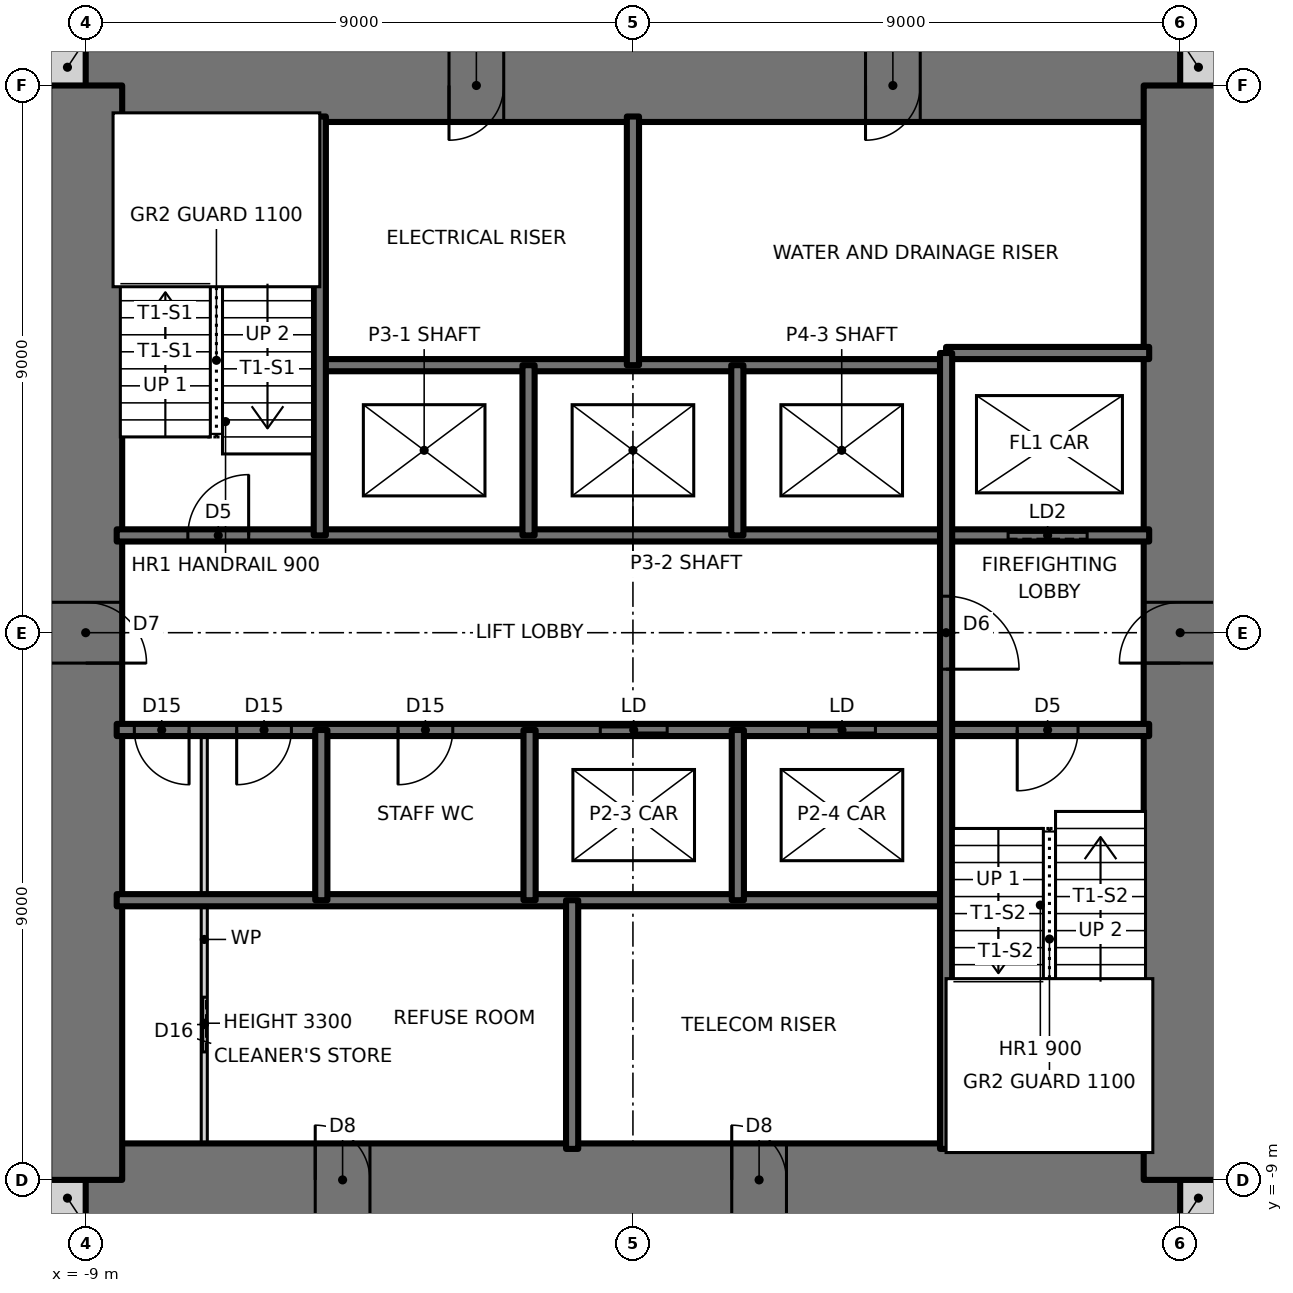
"""IFC4 building model, lengths in metres.
Left out: names, types, materials, properties, quantities, classifications, styles, units other than length and angle.
Written with IfcOpenShell. Run it as: python <this file> out.ifc"""

import sys

from ifc_helpers import new_model, si_unit, direction, frame, frame_2d, origin, place, context, subcontext, project, spatial, rectangle, extrude, element, fill, save


model = new_model("IFC4")
c1 = context("Model", 3, precision=1e-05, world=origin(), true_north=direction((0.0, 1.0)))
c2 = subcontext(c1, "Body", "Model", "MODEL_VIEW")
j1 = project(units=[si_unit("LENGTHUNIT", "METRE"), si_unit("PLANEANGLEUNIT", "RADIAN")], contexts=[c1])
p1 = place(None, origin())
s1 = spatial("IfcSite", under=j1, at=p1, CompositionType="ELEMENT")
p2 = place(p1, origin())
s2 = spatial("IfcBuilding", under=s1, at=p2, CompositionType="ELEMENT")
p3 = place(p2, frame((0.0, 0.0, 105.0)))
s3 = spatial("IfcBuildingStorey", under=s2, at=p3, CompositionType="ELEMENT", Elevation=105.0)
for number, where, z_axis, x_axis in (
    (1, (-9.6, -9.3, 0.0), (0.0, 0.0, 1.0), (1.0, 0.0, 0.0)),
    (2, (9.0, -9.3, 0.0), (0.0, 0.0, 1.0), (1.0, 0.0, 0.0)),
    (3, (9.0, 9.3, 0.0), (0.0, 0.0, 1.0), (1.0, 0.0, 0.0)),
    (4, (-9.6, 9.3, 0.0), (0.0, 0.0, 1.0), (1.0, 0.0, 0.0)),
):
    element("IfcWall", number, at=place(p3, frame(where, z_axis=z_axis, x_axis=x_axis)), inside=s3, PredefinedType="SOLIDWALL", context=c2, shape_type="SweptSolid", body=[
        extrude(rectangle(XDim=0.6, YDim=0.6, at=frame_2d((0.3, 0.0))), origin(), (0.0, 0.0, 1.0), 3.5),
    ])
p4 = place(p3, frame((-9.0, -9.0, 0.0), z_axis=(0.0, 0.0, 1.0), x_axis=(1.0, 0.0, 0.0)))
e5 = element("IfcWall", 5, at=p4, inside=s3, PredefinedType="SHEAR", context=c2, shape_type="SweptSolid", body=[
    extrude(rectangle(XDim=18.0, YDim=1.2, at=frame_2d((9.0, 0.0))), origin(), (0.0, 0.0, 1.0), 3.5),
])
p5 = place(p4, frame((3.775, 0.0, 0.0)))
e6 = element("IfcOpeningElement", 6, at=p5, cuts=e5, PredefinedType="OPENING", context=c2, shape_type="SweptSolid", body=[
    extrude(rectangle(XDim=0.9, YDim=2.1, at=frame_2d((0.45, 1.05))), frame((0.0, 0.61, 0.0), z_axis=(0.0, -1.0, 0.0), x_axis=(1.0, 0.0, 0.0)), (0.0, 0.0, 1.0), 1.22),
])
p6 = place(p4, frame((10.625, 0.0, 0.0)))
e7 = element("IfcOpeningElement", 7, at=p6, cuts=e5, PredefinedType="OPENING", context=c2, shape_type="SweptSolid", body=[
    extrude(rectangle(XDim=0.9, YDim=2.1, at=frame_2d((0.45, 1.05))), frame((0.0, 0.61, 0.0), z_axis=(0.0, -1.0, 0.0), x_axis=(1.0, 0.0, 0.0)), (0.0, 0.0, 1.0), 1.22),
])
p7 = place(p3, frame((9.0, 9.0, 0.0), z_axis=(0.0, 0.0, 1.0), x_axis=(-1.0, 0.0, 0.0)))
e8 = element("IfcWall", 8, at=p7, inside=s3, PredefinedType="SHEAR", context=c2, shape_type="SweptSolid", body=[
    extrude(rectangle(XDim=18.0, YDim=1.2, at=frame_2d((9.0, 0.0))), origin(), (0.0, 0.0, 1.0), 3.5),
])
p8 = place(p7, frame((11.125, 0.0, 0.0)))
e9 = element("IfcOpeningElement", 9, at=p8, cuts=e8, PredefinedType="OPENING", context=c2, shape_type="SweptSolid", body=[
    extrude(rectangle(XDim=0.9, YDim=2.1, at=frame_2d((0.45, 1.05))), frame((0.0, 0.61, 0.0), z_axis=(0.0, -1.0, 0.0), x_axis=(1.0, 0.0, 0.0)), (0.0, 0.0, 1.0), 1.22),
])
p9 = place(p7, frame((4.275, 0.0, 0.0)))
e10 = element("IfcOpeningElement", 10, at=p9, cuts=e8, PredefinedType="OPENING", context=c2, shape_type="SweptSolid", body=[
    extrude(rectangle(XDim=0.9, YDim=2.1, at=frame_2d((0.45, 1.05))), frame((0.0, 0.61, 0.0), z_axis=(0.0, -1.0, 0.0), x_axis=(1.0, 0.0, 0.0)), (0.0, 0.0, 1.0), 1.22),
])
p10 = place(p3, frame((9.0, -9.0, 0.0), z_axis=(0.0, 0.0, 1.0), x_axis=(0.0, 1.0, 0.0)))
e11 = element("IfcWall", 11, at=p10, inside=s3, PredefinedType="SHEAR", context=c2, shape_type="SweptSolid", body=[
    extrude(rectangle(XDim=18.0, YDim=1.2, at=frame_2d((9.0, 0.0))), origin(), (0.0, 0.0, 1.0), 3.5),
])
p11 = place(p10, frame((8.5, 0.0, 0.0)))
e12 = element("IfcOpeningElement", 12, at=p11, cuts=e11, PredefinedType="OPENING", context=c2, shape_type="SweptSolid", body=[
    extrude(rectangle(XDim=1.0, YDim=2.1, at=frame_2d((0.5, 1.05))), frame((0.0, 0.61, 0.0), z_axis=(0.0, -1.0, 0.0), x_axis=(1.0, 0.0, 0.0)), (0.0, 0.0, 1.0), 1.22),
])
p12 = place(p3, frame((-9.0, 9.0, 0.0), z_axis=(0.0, 0.0, 1.0), x_axis=(0.0, -1.0, 0.0)))
e13 = element("IfcWall", 13, at=p12, inside=s3, PredefinedType="SHEAR", context=c2, shape_type="SweptSolid", body=[
    extrude(rectangle(XDim=18.0, YDim=1.2, at=frame_2d((9.0, 0.0))), origin(), (0.0, 0.0, 1.0), 3.5),
])
p13 = place(p12, frame((8.5, 0.0, 0.0)))
e14 = element("IfcOpeningElement", 14, at=p13, cuts=e13, PredefinedType="OPENING", context=c2, shape_type="SweptSolid", body=[
    extrude(rectangle(XDim=1.0, YDim=2.1, at=frame_2d((0.5, 1.05))), frame((0.0, 0.61, 0.0), z_axis=(0.0, -1.0, 0.0), x_axis=(1.0, 0.0, 0.0)), (0.0, 0.0, 1.0), 1.22),
])
p14 = place(p3, frame((-8.49, -4.4, 0.0), z_axis=(0.0, 0.0, 1.0), x_axis=(1.0, 0.0, 0.0)))
e15 = element("IfcWall", 15, at=p14, inside=s3, PredefinedType="SOLIDWALL", context=c2, shape_type="SweptSolid", body=[
    extrude(rectangle(XDim=13.64, YDim=0.2, at=frame_2d((6.82, 0.0))), origin(), (0.0, 0.0, 1.0), 3.5),
])
p15 = place(p3, frame((-8.49, -1.6, 0.0), z_axis=(0.0, 0.0, 1.0), x_axis=(1.0, 0.0, 0.0)))
e16 = element("IfcWall", 16, at=p15, inside=s3, PredefinedType="SOLIDWALL", context=c2, shape_type="SweptSolid", body=[
    extrude(rectangle(XDim=16.98, YDim=0.2, at=frame_2d((8.49, 0.0))), origin(), (0.0, 0.0, 1.0), 3.5),
])
p16 = place(p15, frame((14.81, 0.0, 0.0)))
e17 = element("IfcOpeningElement", 17, at=p16, cuts=e16, PredefinedType="OPENING", context=c2, shape_type="SweptSolid", body=[
    extrude(rectangle(XDim=1.0, YDim=2.1, at=frame_2d((0.5, 1.05))), frame((0.0, 0.11, 0.0), z_axis=(0.0, -1.0, 0.0), x_axis=(1.0, 0.0, 0.0)), (0.0, 0.0, 1.0), 0.22),
])
p17 = place(p15, frame((1.973, 0.0, 0.0)))
e18 = element("IfcOpeningElement", 18, at=p17, cuts=e16, PredefinedType="OPENING", context=c2, shape_type="SweptSolid", body=[
    extrude(rectangle(XDim=0.9, YDim=2.1, at=frame_2d((0.45, 1.05))), frame((0.0, 0.11, 0.0), z_axis=(0.0, -1.0, 0.0), x_axis=(1.0, 0.0, 0.0)), (0.0, 0.0, 1.0), 0.22),
])
p18 = place(p15, frame((0.29, 0.0, 0.0)))
e19 = element("IfcOpeningElement", 19, at=p18, cuts=e16, PredefinedType="OPENING", context=c2, shape_type="SweptSolid", body=[
    extrude(rectangle(XDim=0.9, YDim=2.1, at=frame_2d((0.45, 1.05))), frame((0.0, 0.11, 0.0), z_axis=(0.0, -1.0, 0.0), x_axis=(1.0, 0.0, 0.0)), (0.0, 0.0, 1.0), 0.22),
])
p19 = place(p15, frame((4.627, 0.0, 0.0)))
e20 = element("IfcOpeningElement", 20, at=p19, cuts=e16, PredefinedType="OPENING", context=c2, shape_type="SweptSolid", body=[
    extrude(rectangle(XDim=0.9, YDim=2.1, at=frame_2d((0.45, 1.05))), frame((0.0, 0.11, 0.0), z_axis=(0.0, -1.0, 0.0), x_axis=(1.0, 0.0, 0.0)), (0.0, 0.0, 1.0), 0.22),
])
p20 = place(p15, frame((7.953, 0.0, 0.0)))
e21 = element("IfcOpeningElement", 21, at=p20, cuts=e16, PredefinedType="OPENING", context=c2, shape_type="SweptSolid", body=[
    extrude(rectangle(XDim=1.1, YDim=2.1, at=frame_2d((0.55, 1.05))), frame((0.0, 0.11, 0.0), z_axis=(0.0, -1.0, 0.0), x_axis=(1.0, 0.0, 0.0)), (0.0, 0.0, 1.0), 0.22),
])
p21 = place(p15, frame((11.378, 0.0, 0.0)))
e22 = element("IfcOpeningElement", 22, at=p21, cuts=e16, PredefinedType="OPENING", context=c2, shape_type="SweptSolid", body=[
    extrude(rectangle(XDim=1.1, YDim=2.1, at=frame_2d((0.55, 1.05))), frame((0.0, 0.11, 0.0), z_axis=(0.0, -1.0, 0.0), x_axis=(1.0, 0.0, 0.0)), (0.0, 0.0, 1.0), 0.22),
])
p22 = place(p3, frame((-8.49, 1.6, 0.0), z_axis=(0.0, 0.0, 1.0), x_axis=(1.0, 0.0, 0.0)))
e23 = element("IfcWall", 23, at=p22, inside=s3, PredefinedType="SOLIDWALL", context=c2, shape_type="SweptSolid", body=[
    extrude(rectangle(XDim=16.98, YDim=0.2, at=frame_2d((8.49, 0.0))), origin(), (0.0, 0.0, 1.0), 3.5),
])
p23 = place(p22, frame((1.17, 0.0, 0.0)))
e24 = element("IfcOpeningElement", 24, at=p23, cuts=e23, PredefinedType="OPENING", context=c2, shape_type="SweptSolid", body=[
    extrude(rectangle(XDim=1.0, YDim=2.1, at=frame_2d((0.5, 1.05))), frame((0.0, 0.11, 0.0), z_axis=(0.0, -1.0, 0.0), x_axis=(1.0, 0.0, 0.0)), (0.0, 0.0, 1.0), 0.22),
])
p24 = place(p22, frame((14.66, 0.0, 0.0)))
e25 = element("IfcOpeningElement", 25, at=p24, cuts=e23, PredefinedType="OPENING", context=c2, shape_type="SweptSolid", body=[
    extrude(rectangle(XDim=1.3, YDim=2.1, at=frame_2d((0.65, 1.05))), frame((0.0, 0.11, 0.0), z_axis=(0.0, -1.0, 0.0), x_axis=(1.0, 0.0, 0.0)), (0.0, 0.0, 1.0), 0.22),
])
p25 = place(p3, frame((-5.15, 4.4, 0.0), z_axis=(0.0, 0.0, 1.0), x_axis=(1.0, 0.0, 0.0)))
e26 = element("IfcWall", 26, at=p25, inside=s3, PredefinedType="SOLIDWALL", context=c2, shape_type="SweptSolid", body=[
    extrude(rectangle(XDim=10.3, YDim=0.2, at=frame_2d((5.15, 0.0))), origin(), (0.0, 0.0, 1.0), 3.5),
])
p26 = place(p3, frame((5.15, 4.6, 0.0), z_axis=(0.0, 0.0, 1.0), x_axis=(1.0, 0.0, 0.0)))
e27 = element("IfcWall", 27, at=p26, inside=s3, PredefinedType="SOLIDWALL", context=c2, shape_type="SweptSolid", body=[
    extrude(rectangle(XDim=3.34, YDim=0.2, at=frame_2d((1.67, 0.0))), origin(), (0.0, 0.0, 1.0), 3.5),
])
p27 = place(p3, frame((5.15, -8.49, 0.0), z_axis=(0.0, 0.0, 1.0), x_axis=(0.0, 1.0, 0.0)))
e28 = element("IfcWall", 28, at=p27, inside=s3, PredefinedType="SOLIDWALL", context=c2, shape_type="SweptSolid", body=[
    extrude(rectangle(XDim=13.09, YDim=0.2, at=frame_2d((6.545, 0.0))), origin(), (0.0, 0.0, 1.0), 3.5),
])
p28 = place(p27, frame((7.89, 0.0, 0.0)))
e29 = element("IfcOpeningElement", 29, at=p28, cuts=e28, PredefinedType="OPENING", context=c2, shape_type="SweptSolid", body=[
    extrude(rectangle(XDim=1.2, YDim=2.1, at=frame_2d((0.6, 1.05))), frame((0.0, 0.11, 0.0), z_axis=(0.0, -1.0, 0.0), x_axis=(1.0, 0.0, 0.0)), (0.0, 0.0, 1.0), 0.22),
])
for number, where, z_axis, x_axis in (
    (30, (1.725, -4.4, 0.0), (0.0, 0.0, 1.0), (0.0, 1.0, 0.0)),
    (31, (1.717, 1.6, 0.0), (0.0, 0.0, 1.0), (0.0, 1.0, 0.0)),
):
    element("IfcWall", number, at=place(p3, frame(where, z_axis=z_axis, x_axis=x_axis)), inside=s3, PredefinedType="SOLIDWALL", context=c2, shape_type="SweptSolid", body=[
        extrude(rectangle(XDim=2.8, YDim=0.2, at=frame_2d((1.4, 0.0))), origin(), (0.0, 0.0, 1.0), 3.5),
    ])
for number, where, z_axis, x_axis in (
    (32, (0.0, 4.4, 0.0), (0.0, 0.0, 1.0), (0.0, 1.0, 0.0)),
    (33, (-1.0, -8.49, 0.0), (0.0, 0.0, 1.0), (0.0, 1.0, 0.0)),
):
    element("IfcWall", number, at=place(p3, frame(where, z_axis=z_axis, x_axis=x_axis)), inside=s3, PredefinedType="SOLIDWALL", context=c2, shape_type="SweptSolid", body=[
        extrude(rectangle(XDim=4.09, YDim=0.2, at=frame_2d((2.045, 0.0))), origin(), (0.0, 0.0, 1.0), 3.5),
    ])
for number, where, z_axis, x_axis in (
    (34, (-1.7, -4.4, 0.0), (0.0, 0.0, 1.0), (0.0, 1.0, 0.0)),
    (35, (-1.717, 1.6, 0.0), (0.0, 0.0, 1.0), (0.0, 1.0, 0.0)),
    (36, (-5.125, -4.4, 0.0), (0.0, 0.0, 1.0), (0.0, 1.0, 0.0)),
):
    element("IfcWall", number, at=place(p3, frame(where, z_axis=z_axis, x_axis=x_axis)), inside=s3, PredefinedType="SOLIDWALL", context=c2, shape_type="SweptSolid", body=[
        extrude(rectangle(XDim=2.8, YDim=0.2, at=frame_2d((1.4, 0.0))), origin(), (0.0, 0.0, 1.0), 3.5),
    ])
p29 = place(p3, frame((-5.15, 1.6, 0.0), z_axis=(0.0, 0.0, 1.0), x_axis=(0.0, 1.0, 0.0)))
e37 = element("IfcWall", 37, at=p29, inside=s3, PredefinedType="SOLIDWALL", context=c2, shape_type="SweptSolid", body=[
    extrude(rectangle(XDim=6.89, YDim=0.2, at=frame_2d((3.445, 0.0))), origin(), (0.0, 0.0, 1.0), 3.5),
])
p30 = place(p3, frame((-7.05, -8.49, 0.0), z_axis=(0.0, 0.0, 1.0), x_axis=(0.0, 1.0, 0.0)))
e38 = element("IfcWall", 38, at=p30, inside=s3, PredefinedType="PARTITIONING", context=c2, shape_type="SweptSolid", body=[
    extrude(rectangle(XDim=6.89, YDim=0.1, at=frame_2d((3.445, 0.0))), origin(), (0.0, 0.0, 1.0), 3.3),
])
p31 = place(p30, frame((1.595, 0.0, 0.0)))
e39 = element("IfcOpeningElement", 39, at=p31, cuts=e38, PredefinedType="OPENING", context=c2, shape_type="SweptSolid", body=[
    extrude(rectangle(XDim=0.9, YDim=2.1, at=frame_2d((0.45, 1.05))), frame((0.0, 0.06, 0.0), z_axis=(0.0, -1.0, 0.0), x_axis=(1.0, 0.0, 0.0)), (0.0, 0.0, 1.0), 0.12),
])
p32 = place(p23, origin())
e40 = element("IfcDoor", 40, at=p32, inside=s3, OperationType="SINGLE_SWING_RIGHT", PredefinedType="DOOR", context=c2, shape_type="SweptSolid", body=[
    extrude(rectangle(XDim=1.0, YDim=2.1, at=frame_2d((0.5, 1.05))), frame((0.0, 0.025, 0.0), z_axis=(0.0, -1.0, 0.0), x_axis=(1.0, 0.0, 0.0)), (0.0, 0.0, 1.0), 0.05),
])
fill(e24, e40)
p33 = place(p16, frame((1.0, 0.0, 0.0), z_axis=(0.0, 0.0, 1.0), x_axis=(-1.0, 0.0, 0.0)))
e41 = element("IfcDoor", 41, at=p33, inside=s3, OperationType="SINGLE_SWING_RIGHT", PredefinedType="DOOR", context=c2, shape_type="SweptSolid", body=[
    extrude(rectangle(XDim=1.0, YDim=2.1, at=frame_2d((0.5, 1.05))), frame((0.0, 0.025, 0.0), z_axis=(0.0, -1.0, 0.0), x_axis=(1.0, 0.0, 0.0)), (0.0, 0.0, 1.0), 0.05),
])
fill(e17, e41)
p34 = place(p28, frame((1.2, 0.0, 0.0), z_axis=(0.0, 0.0, 1.0), x_axis=(-1.0, 0.0, 0.0)))
e42 = element("IfcDoor", 42, at=p34, inside=s3, OperationType="SINGLE_SWING_RIGHT", PredefinedType="DOOR", context=c2, shape_type="SweptSolid", body=[
    extrude(rectangle(XDim=1.2, YDim=2.1, at=frame_2d((0.6, 1.05))), frame((0.0, 0.025, 0.0), z_axis=(0.0, -1.0, 0.0), x_axis=(1.0, 0.0, 0.0)), (0.0, 0.0, 1.0), 0.05),
])
fill(e29, e42)
p35 = place(p17, frame((0.9, 0.0, 0.0), z_axis=(0.0, 0.0, 1.0), x_axis=(-1.0, 0.0, 0.0)))
e43 = element("IfcDoor", 43, at=p35, inside=s3, OperationType="SINGLE_SWING_RIGHT", PredefinedType="DOOR", context=c2, shape_type="SweptSolid", body=[
    extrude(rectangle(XDim=0.9, YDim=2.1, at=frame_2d((0.45, 1.05))), frame((0.0, 0.025, 0.0), z_axis=(0.0, -1.0, 0.0), x_axis=(1.0, 0.0, 0.0)), (0.0, 0.0, 1.0), 0.05),
])
fill(e18, e43)
p36 = place(p18, frame((0.9, 0.0, 0.0), z_axis=(0.0, 0.0, 1.0), x_axis=(-1.0, 0.0, 0.0)))
e44 = element("IfcDoor", 44, at=p36, inside=s3, OperationType="SINGLE_SWING_LEFT", PredefinedType="DOOR", context=c2, shape_type="SweptSolid", body=[
    extrude(rectangle(XDim=0.9, YDim=2.1, at=frame_2d((0.45, 1.05))), frame((0.0, 0.025, 0.0), z_axis=(0.0, -1.0, 0.0), x_axis=(1.0, 0.0, 0.0)), (0.0, 0.0, 1.0), 0.05),
])
fill(e19, e44)
p37 = place(p19, frame((0.9, 0.0, 0.0), z_axis=(0.0, 0.0, 1.0), x_axis=(-1.0, 0.0, 0.0)))
e45 = element("IfcDoor", 45, at=p37, inside=s3, OperationType="SINGLE_SWING_RIGHT", PredefinedType="DOOR", context=c2, shape_type="SweptSolid", body=[
    extrude(rectangle(XDim=0.9, YDim=2.1, at=frame_2d((0.45, 1.05))), frame((0.0, 0.025, 0.0), z_axis=(0.0, -1.0, 0.0), x_axis=(1.0, 0.0, 0.0)), (0.0, 0.0, 1.0), 0.05),
])
fill(e20, e45)
p38 = place(p31, origin())
e46 = element("IfcDoor", 46, at=p38, inside=s3, OperationType="SLIDING_TO_RIGHT", PredefinedType="DOOR", context=c2, shape_type="SweptSolid", body=[
    extrude(rectangle(XDim=0.9, YDim=2.1, at=frame_2d((0.45, 1.05))), frame((0.0, 0.025, 0.0), z_axis=(0.0, -1.0, 0.0), x_axis=(1.0, 0.0, 0.0)), (0.0, 0.0, 1.0), 0.05),
])
fill(e39, e46)
p39 = place(p13, origin())
e47 = element("IfcDoor", 47, at=p39, inside=s3, OperationType="SINGLE_SWING_RIGHT", PredefinedType="DOOR", context=c2, shape_type="SweptSolid", body=[
    extrude(rectangle(XDim=1.0, YDim=2.1, at=frame_2d((0.5, 1.05))), frame((0.0, 0.025, 0.0), z_axis=(0.0, -1.0, 0.0), x_axis=(1.0, 0.0, 0.0)), (0.0, 0.0, 1.0), 0.05),
])
fill(e14, e47)
p40 = place(p11, origin())
e48 = element("IfcDoor", 48, at=p40, inside=s3, OperationType="SINGLE_SWING_LEFT", PredefinedType="DOOR", context=c2, shape_type="SweptSolid", body=[
    extrude(rectangle(XDim=1.0, YDim=2.1, at=frame_2d((0.5, 1.05))), frame((0.0, 0.025, 0.0), z_axis=(0.0, -1.0, 0.0), x_axis=(1.0, 0.0, 0.0)), (0.0, 0.0, 1.0), 0.05),
])
fill(e12, e48)
p41 = place(p8, origin())
e49 = element("IfcDoor", 49, at=p41, inside=s3, OperationType="SINGLE_SWING_RIGHT", PredefinedType="DOOR", context=c2, shape_type="SweptSolid", body=[
    extrude(rectangle(XDim=0.9, YDim=2.1, at=frame_2d((0.45, 1.05))), frame((0.0, 0.025, 0.0), z_axis=(0.0, -1.0, 0.0), x_axis=(1.0, 0.0, 0.0)), (0.0, 0.0, 1.0), 0.05),
])
fill(e9, e49)
p42 = place(p9, origin())
e50 = element("IfcDoor", 50, at=p42, inside=s3, OperationType="SINGLE_SWING_RIGHT", PredefinedType="DOOR", context=c2, shape_type="SweptSolid", body=[
    extrude(rectangle(XDim=0.9, YDim=2.1, at=frame_2d((0.45, 1.05))), frame((0.0, 0.025, 0.0), z_axis=(0.0, -1.0, 0.0), x_axis=(1.0, 0.0, 0.0)), (0.0, 0.0, 1.0), 0.05),
])
fill(e10, e50)
p43 = place(p5, origin())
e51 = element("IfcDoor", 51, at=p43, inside=s3, OperationType="SINGLE_SWING_LEFT", PredefinedType="DOOR", context=c2, shape_type="SweptSolid", body=[
    extrude(rectangle(XDim=0.9, YDim=2.1, at=frame_2d((0.45, 1.05))), frame((0.0, 0.025, 0.0), z_axis=(0.0, -1.0, 0.0), x_axis=(1.0, 0.0, 0.0)), (0.0, 0.0, 1.0), 0.05),
])
fill(e6, e51)
p44 = place(p6, origin())
e52 = element("IfcDoor", 52, at=p44, inside=s3, OperationType="SINGLE_SWING_LEFT", PredefinedType="DOOR", context=c2, shape_type="SweptSolid", body=[
    extrude(rectangle(XDim=0.9, YDim=2.1, at=frame_2d((0.45, 1.05))), frame((0.0, 0.025, 0.0), z_axis=(0.0, -1.0, 0.0), x_axis=(1.0, 0.0, 0.0)), (0.0, 0.0, 1.0), 0.05),
])
fill(e7, e52)
p45 = place(p20, origin())
e53 = element("IfcDoor", 53, at=p45, inside=s3, OperationType="DOUBLE_DOOR_SLIDING", PredefinedType="DOOR", context=c2, shape_type="SweptSolid", body=[
    extrude(rectangle(XDim=1.1, YDim=2.1, at=frame_2d((0.55, 1.05))), frame((0.0, 0.025, 0.0), z_axis=(0.0, -1.0, 0.0), x_axis=(1.0, 0.0, 0.0)), (0.0, 0.0, 1.0), 0.05),
])
fill(e21, e53)
p46 = place(p21, origin())
e54 = element("IfcDoor", 54, at=p46, inside=s3, OperationType="DOUBLE_DOOR_SLIDING", PredefinedType="DOOR", context=c2, shape_type="SweptSolid", body=[
    extrude(rectangle(XDim=1.1, YDim=2.1, at=frame_2d((0.55, 1.05))), frame((0.0, 0.025, 0.0), z_axis=(0.0, -1.0, 0.0), x_axis=(1.0, 0.0, 0.0)), (0.0, 0.0, 1.0), 0.05),
])
fill(e22, e54)
p47 = place(p24, origin())
e55 = element("IfcDoor", 55, at=p47, inside=s3, OperationType="SLIDING_TO_LEFT", PredefinedType="DOOR", context=c2, shape_type="SweptSolid", body=[
    extrude(rectangle(XDim=1.3, YDim=2.1, at=frame_2d((0.65, 1.05))), frame((0.0, 0.025, 0.0), z_axis=(0.0, -1.0, 0.0), x_axis=(1.0, 0.0, 0.0)), (0.0, 0.0, 1.0), 0.05),
])
fill(e25, e55)
save(model, sys.argv[1])
